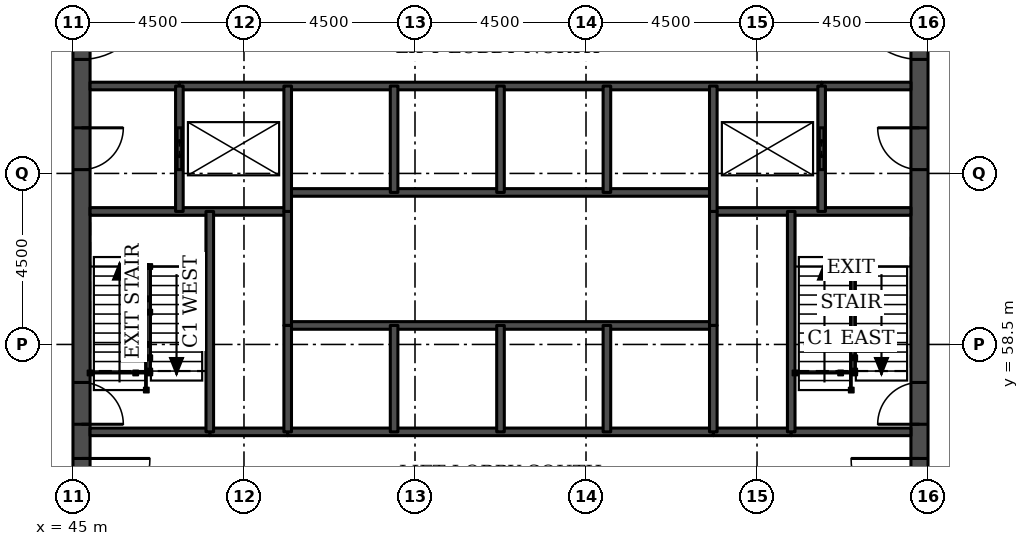
"""IFC4 building model, lengths in metres.
Left out: names, types, materials, properties, quantities, classifications, styles, units other than length and angle.
Written with IfcOpenShell. Run it as: python <this file> out.ifc"""

import sys

from ifc_helpers import new_model, si_unit, direction, frame, frame_2d, origin, place, context, subcontext, project, spatial, rectangle, extrude, element, fill, save


model = new_model("IFC4")
c1 = context("Model", 3, precision=1e-05, world=origin(), true_north=direction((0.0, 1.0)))
c2 = subcontext(c1, "Body", "Model", "MODEL_VIEW")
j1 = project(units=[si_unit("LENGTHUNIT", "METRE"), si_unit("PLANEANGLEUNIT", "RADIAN")], contexts=[c1])
p1 = place(None, origin())
s1 = spatial("IfcSite", under=j1, at=p1, CompositionType="ELEMENT")
p2 = place(p1, origin())
s2 = spatial("IfcBuilding", under=s1, at=p2, CompositionType="ELEMENT")
p3 = place(p2, frame((0.0, 0.0, 78.9)))
s3 = spatial("IfcBuildingStorey", under=s2, at=p3, CompositionType="ELEMENT", Elevation=78.9)
p4 = place(p3, frame((45.225, 49.5, 0.0), z_axis=(0.0, 0.0, 1.0), x_axis=(0.0, 1.0, 0.0)))
e1 = element("IfcWall", 1, at=p4, inside=s3, PredefinedType="SHEAR", context=c2, shape_type="SweptSolid", body=[
    extrude(rectangle(XDim=22.5, YDim=0.45, at=frame_2d((11.25, 0.0))), origin(), (0.0, 0.0, 1.0), 3.7),
])
p5 = place(p4, frame((4.2, 0.0, 0.0)))
e2 = element("IfcOpeningElement", 2, at=p5, cuts=e1, PredefinedType="OPENING", context=c2, shape_type="SweptSolid", body=[
    extrude(rectangle(XDim=1.8, YDim=2.1, at=frame_2d((0.9, 1.05))), frame((0.0, 0.235, 0.0), z_axis=(0.0, -1.0, 0.0), x_axis=(1.0, 0.0, 0.0)), (0.0, 0.0, 1.0), 0.47),
])
p6 = place(p4, frame((6.9, 0.0, 0.0)))
e3 = element("IfcOpeningElement", 3, at=p6, cuts=e1, PredefinedType="OPENING", context=c2, shape_type="SweptSolid", body=[
    extrude(rectangle(XDim=1.1, YDim=2.1, at=frame_2d((0.55, 1.05))), frame((0.0, 0.235, 0.0), z_axis=(0.0, -1.0, 0.0), x_axis=(1.0, 0.0, 0.0)), (0.0, 0.0, 1.0), 0.47),
])
p7 = place(p4, frame((13.6, 0.0, 0.0)))
e4 = element("IfcOpeningElement", 4, at=p7, cuts=e1, PredefinedType="OPENING", context=c2, shape_type="SweptSolid", body=[
    extrude(rectangle(XDim=1.1, YDim=2.1, at=frame_2d((0.55, 1.05))), frame((0.0, 0.235, 0.0), z_axis=(0.0, -1.0, 0.0), x_axis=(1.0, 0.0, 0.0)), (0.0, 0.0, 1.0), 0.47),
])
p8 = place(p4, frame((16.5, 0.0, 0.0)))
e5 = element("IfcOpeningElement", 5, at=p8, cuts=e1, PredefinedType="OPENING", context=c2, shape_type="SweptSolid", body=[
    extrude(rectangle(XDim=1.8, YDim=2.1, at=frame_2d((0.9, 1.05))), frame((0.0, 0.235, 0.0), z_axis=(0.0, -1.0, 0.0), x_axis=(1.0, 0.0, 0.0)), (0.0, 0.0, 1.0), 0.47),
])
p9 = place(p3, frame((67.275, 49.5, 0.0), z_axis=(0.0, 0.0, 1.0), x_axis=(0.0, 1.0, 0.0)))
e6 = element("IfcWall", 6, at=p9, inside=s3, PredefinedType="SHEAR", context=c2, shape_type="SweptSolid", body=[
    extrude(rectangle(XDim=22.5, YDim=0.45, at=frame_2d((11.25, 0.0))), origin(), (0.0, 0.0, 1.0), 3.7),
])
p10 = place(p9, frame((4.2, 0.0, 0.0)))
e7 = element("IfcOpeningElement", 7, at=p10, cuts=e6, PredefinedType="OPENING", context=c2, shape_type="SweptSolid", body=[
    extrude(rectangle(XDim=1.8, YDim=2.1, at=frame_2d((0.9, 1.05))), frame((0.0, 0.235, 0.0), z_axis=(0.0, -1.0, 0.0), x_axis=(1.0, 0.0, 0.0)), (0.0, 0.0, 1.0), 0.47),
])
p11 = place(p9, frame((6.9, 0.0, 0.0)))
e8 = element("IfcOpeningElement", 8, at=p11, cuts=e6, PredefinedType="OPENING", context=c2, shape_type="SweptSolid", body=[
    extrude(rectangle(XDim=1.1, YDim=2.1, at=frame_2d((0.55, 1.05))), frame((0.0, 0.235, 0.0), z_axis=(0.0, -1.0, 0.0), x_axis=(1.0, 0.0, 0.0)), (0.0, 0.0, 1.0), 0.47),
])
p12 = place(p9, frame((13.6, 0.0, 0.0)))
e9 = element("IfcOpeningElement", 9, at=p12, cuts=e6, PredefinedType="OPENING", context=c2, shape_type="SweptSolid", body=[
    extrude(rectangle(XDim=1.1, YDim=2.1, at=frame_2d((0.55, 1.05))), frame((0.0, 0.235, 0.0), z_axis=(0.0, -1.0, 0.0), x_axis=(1.0, 0.0, 0.0)), (0.0, 0.0, 1.0), 0.47),
])
p13 = place(p9, frame((16.5, 0.0, 0.0)))
e10 = element("IfcOpeningElement", 10, at=p13, cuts=e6, PredefinedType="OPENING", context=c2, shape_type="SweptSolid", body=[
    extrude(rectangle(XDim=1.8, YDim=2.1, at=frame_2d((0.9, 1.05))), frame((0.0, 0.235, 0.0), z_axis=(0.0, -1.0, 0.0), x_axis=(1.0, 0.0, 0.0)), (0.0, 0.0, 1.0), 0.47),
])
for number, where, z_axis, x_axis in (
    (11, (48.6, 56.2, 0.0), (0.0, 0.0, 1.0), (1.0, 0.0, 0.0)),
    (12, (61.85, 56.2, 0.0), (0.0, 0.0, 1.0), (1.0, 0.0, 0.0)),
):
    element("IfcWall", number, at=place(p3, frame(where, z_axis=z_axis, x_axis=x_axis)), inside=s3, PredefinedType="SOLIDWALL", context=c2, shape_type="SweptSolid", body=[
        extrude(rectangle(XDim=2.05, YDim=0.2, at=frame_2d((1.025, 0.0))), origin(), (0.0, 0.0, 1.0), 3.55),
    ])
p14 = place(p3, frame((45.45, 56.2, 0.0), z_axis=(0.0, 0.0, 1.0), x_axis=(1.0, 0.0, 0.0)))
e13 = element("IfcWall", 13, at=p14, inside=s3, PredefinedType="SOLIDWALL", context=c2, shape_type="SweptSolid", body=[
    extrude(rectangle(XDim=3.15, YDim=0.2, at=frame_2d((1.575, 0.0))), origin(), (0.0, 0.0, 1.0), 3.55),
])
p15 = place(p3, frame((50.65, 56.2, 0.0), z_axis=(0.0, 0.0, 1.0), x_axis=(1.0, 0.0, 0.0)))
e14 = element("IfcWall", 14, at=p15, inside=s3, PredefinedType="SOLIDWALL", context=c2, shape_type="SweptSolid", body=[
    extrude(rectangle(XDim=11.2, YDim=0.2, at=frame_2d((5.6, 0.0))), origin(), (0.0, 0.0, 1.0), 3.55),
])
p16 = place(p3, frame((63.9, 56.2, 0.0), z_axis=(0.0, 0.0, 1.0), x_axis=(1.0, 0.0, 0.0)))
e15 = element("IfcWall", 15, at=p16, inside=s3, PredefinedType="SOLIDWALL", context=c2, shape_type="SweptSolid", body=[
    extrude(rectangle(XDim=3.15, YDim=0.2, at=frame_2d((1.575, 0.0))), origin(), (0.0, 0.0, 1.0), 3.55),
])
p17 = place(p3, frame((50.65, 59.0, 0.0), z_axis=(0.0, 0.0, 1.0), x_axis=(1.0, 0.0, 0.0)))
e16 = element("IfcWall", 16, at=p17, inside=s3, PredefinedType="SOLIDWALL", context=c2, shape_type="SweptSolid", body=[
    extrude(rectangle(XDim=11.2, YDim=0.2, at=frame_2d((5.6, 0.0))), origin(), (0.0, 0.0, 1.0), 3.7),
])
for number, where, z_axis, x_axis in (
    (17, (45.45, 62.0, 0.0), (0.0, 0.0, 1.0), (1.0, 0.0, 0.0)),
    (18, (61.85, 62.0, 0.0), (0.0, 0.0, 1.0), (1.0, 0.0, 0.0)),
):
    element("IfcWall", number, at=place(p3, frame(where, z_axis=z_axis, x_axis=x_axis)), inside=s3, PredefinedType="SOLIDWALL", context=c2, shape_type="SweptSolid", body=[
        extrude(rectangle(XDim=5.2, YDim=0.2, at=frame_2d((2.6, 0.0))), origin(), (0.0, 0.0, 1.0), 3.55),
    ])
p18 = place(p3, frame((50.65, 62.5, 0.0), z_axis=(0.0, 0.0, 1.0), x_axis=(1.0, 0.0, 0.0)))
e19 = element("IfcWall", 19, at=p18, inside=s3, PredefinedType="SOLIDWALL", context=c2, shape_type="SweptSolid", body=[
    extrude(rectangle(XDim=11.2, YDim=0.2, at=frame_2d((5.6, 0.0))), origin(), (0.0, 0.0, 1.0), 3.7),
])
for number, where, z_axis, x_axis in (
    (20, (45.45, 65.3, 0.0), (0.0, 0.0, 1.0), (1.0, 0.0, 0.0)),
    (21, (64.7, 65.3, 0.0), (0.0, 0.0, 1.0), (1.0, 0.0, 0.0)),
):
    element("IfcWall", number, at=place(p3, frame(where, z_axis=z_axis, x_axis=x_axis)), inside=s3, PredefinedType="SOLIDWALL", context=c2, shape_type="SweptSolid", body=[
        extrude(rectangle(XDim=2.35, YDim=0.2, at=frame_2d((1.175, 0.0))), origin(), (0.0, 0.0, 1.0), 3.55),
    ])
p19 = place(p3, frame((47.8, 65.3, 0.0), z_axis=(0.0, 0.0, 1.0), x_axis=(1.0, 0.0, 0.0)))
e22 = element("IfcWall", 22, at=p19, inside=s3, PredefinedType="SOLIDWALL", context=c2, shape_type="SweptSolid", body=[
    extrude(rectangle(XDim=16.9, YDim=0.2, at=frame_2d((8.45, 0.0))), origin(), (0.0, 0.0, 1.0), 3.55),
])
p20 = place(p3, frame((47.8, 62.0, 0.0), z_axis=(0.0, 0.0, 1.0), x_axis=(0.0, 1.0, 0.0)))
e23 = element("IfcWall", 23, at=p20, inside=s3, PredefinedType="SOLIDWALL", context=c2, shape_type="SweptSolid", body=[
    extrude(rectangle(XDim=3.3, YDim=0.2, at=frame_2d((1.65, 0.0))), origin(), (0.0, 0.0, 1.0), 3.55),
])
p21 = place(p20, frame((1.1, 0.0, 0.0)))
e24 = element("IfcOpeningElement", 24, at=p21, cuts=e23, PredefinedType="OPENING", context=c2, shape_type="SweptSolid", body=[
    extrude(rectangle(XDim=1.1, YDim=2.1, at=frame_2d((0.55, 1.05))), frame((0.0, 0.11, 0.0), z_axis=(0.0, -1.0, 0.0), x_axis=(1.0, 0.0, 0.0)), (0.0, 0.0, 1.0), 0.22),
])
p22 = place(p3, frame((48.6, 56.2, 0.0), z_axis=(0.0, 0.0, 1.0), x_axis=(0.0, 1.0, 0.0)))
e25 = element("IfcWall", 25, at=p22, inside=s3, PredefinedType="SOLIDWALL", context=c2, shape_type="SweptSolid", body=[
    extrude(rectangle(XDim=5.8, YDim=0.2, at=frame_2d((2.9, 0.0))), origin(), (0.0, 0.0, 1.0), 3.55),
])
p23 = place(p3, frame((50.65, 59.0, 0.0), z_axis=(0.0, 0.0, 1.0), x_axis=(0.0, 1.0, 0.0)))
e26 = element("IfcWall", 26, at=p23, inside=s3, PredefinedType="SOLIDWALL", context=c2, shape_type="SweptSolid", body=[
    extrude(rectangle(XDim=3.0, YDim=0.2, at=frame_2d((1.5, 0.0))), origin(), (0.0, 0.0, 1.0), 3.7),
])
p24 = place(p3, frame((50.65, 56.2, 0.0), z_axis=(0.0, 0.0, 1.0), x_axis=(0.0, 1.0, 0.0)))
e27 = element("IfcWall", 27, at=p24, inside=s3, PredefinedType="SOLIDWALL", context=c2, shape_type="SweptSolid", body=[
    extrude(rectangle(XDim=2.8, YDim=0.2, at=frame_2d((1.4, 0.0))), origin(), (0.0, 0.0, 1.0), 3.55),
])
p25 = place(p3, frame((50.65, 62.0, 0.0), z_axis=(0.0, 0.0, 1.0), x_axis=(0.0, 1.0, 0.0)))
e28 = element("IfcWall", 28, at=p25, inside=s3, PredefinedType="SOLIDWALL", context=c2, shape_type="SweptSolid", body=[
    extrude(rectangle(XDim=3.3, YDim=0.2, at=frame_2d((1.65, 0.0))), origin(), (0.0, 0.0, 1.0), 3.55),
])
for number, where, z_axis, x_axis in (
    (29, (53.45, 56.2, 0.0), (0.0, 0.0, 1.0), (0.0, 1.0, 0.0)),
    (30, (53.45, 62.5, 0.0), (0.0, 0.0, 1.0), (0.0, 1.0, 0.0)),
    (31, (56.25, 56.2, 0.0), (0.0, 0.0, 1.0), (0.0, 1.0, 0.0)),
    (32, (56.25, 62.5, 0.0), (0.0, 0.0, 1.0), (0.0, 1.0, 0.0)),
    (33, (59.05, 56.2, 0.0), (0.0, 0.0, 1.0), (0.0, 1.0, 0.0)),
    (34, (59.05, 62.5, 0.0), (0.0, 0.0, 1.0), (0.0, 1.0, 0.0)),
):
    element("IfcWall", number, at=place(p3, frame(where, z_axis=z_axis, x_axis=x_axis)), inside=s3, PredefinedType="SOLIDWALL", context=c2, shape_type="SweptSolid", body=[
        extrude(rectangle(XDim=2.8, YDim=0.2, at=frame_2d((1.4, 0.0))), origin(), (0.0, 0.0, 1.0), 3.55),
    ])
p26 = place(p3, frame((61.85, 59.0, 0.0), z_axis=(0.0, 0.0, 1.0), x_axis=(0.0, 1.0, 0.0)))
e35 = element("IfcWall", 35, at=p26, inside=s3, PredefinedType="SOLIDWALL", context=c2, shape_type="SweptSolid", body=[
    extrude(rectangle(XDim=3.0, YDim=0.2, at=frame_2d((1.5, 0.0))), origin(), (0.0, 0.0, 1.0), 3.7),
])
p27 = place(p3, frame((61.85, 56.2, 0.0), z_axis=(0.0, 0.0, 1.0), x_axis=(0.0, 1.0, 0.0)))
e36 = element("IfcWall", 36, at=p27, inside=s3, PredefinedType="SOLIDWALL", context=c2, shape_type="SweptSolid", body=[
    extrude(rectangle(XDim=2.8, YDim=0.2, at=frame_2d((1.4, 0.0))), origin(), (0.0, 0.0, 1.0), 3.55),
])
p28 = place(p3, frame((61.85, 62.0, 0.0), z_axis=(0.0, 0.0, 1.0), x_axis=(0.0, 1.0, 0.0)))
e37 = element("IfcWall", 37, at=p28, inside=s3, PredefinedType="SOLIDWALL", context=c2, shape_type="SweptSolid", body=[
    extrude(rectangle(XDim=3.3, YDim=0.2, at=frame_2d((1.65, 0.0))), origin(), (0.0, 0.0, 1.0), 3.55),
])
p29 = place(p3, frame((63.9, 56.2, 0.0), z_axis=(0.0, 0.0, 1.0), x_axis=(0.0, 1.0, 0.0)))
e38 = element("IfcWall", 38, at=p29, inside=s3, PredefinedType="SOLIDWALL", context=c2, shape_type="SweptSolid", body=[
    extrude(rectangle(XDim=5.8, YDim=0.2, at=frame_2d((2.9, 0.0))), origin(), (0.0, 0.0, 1.0), 3.55),
])
p30 = place(p3, frame((64.7, 62.0, 0.0), z_axis=(0.0, 0.0, 1.0), x_axis=(0.0, 1.0, 0.0)))
e39 = element("IfcWall", 39, at=p30, inside=s3, PredefinedType="SOLIDWALL", context=c2, shape_type="SweptSolid", body=[
    extrude(rectangle(XDim=3.3, YDim=0.2, at=frame_2d((1.65, 0.0))), origin(), (0.0, 0.0, 1.0), 3.55),
])
p31 = place(p30, frame((1.1, 0.0, 0.0)))
e40 = element("IfcOpeningElement", 40, at=p31, cuts=e39, PredefinedType="OPENING", context=c2, shape_type="SweptSolid", body=[
    extrude(rectangle(XDim=1.1, YDim=2.1, at=frame_2d((0.55, 1.05))), frame((0.0, 0.11, 0.0), z_axis=(0.0, -1.0, 0.0), x_axis=(1.0, 0.0, 0.0)), (0.0, 0.0, 1.0), 0.22),
])
p32 = place(p21, origin())
e41 = element("IfcDoor", 41, at=p32, inside=s3, OperationType="DOUBLE_DOOR_SLIDING", PredefinedType="DOOR", context=c2, shape_type="SweptSolid", body=[
    extrude(rectangle(XDim=1.1, YDim=2.1, at=frame_2d((0.55, 1.05))), frame((0.0, 0.025, 0.0), z_axis=(0.0, -1.0, 0.0), x_axis=(1.0, 0.0, 0.0)), (0.0, 0.0, 1.0), 0.05),
])
fill(e24, e41)
p33 = place(p31, origin())
e42 = element("IfcDoor", 42, at=p33, inside=s3, OperationType="DOUBLE_DOOR_SLIDING", PredefinedType="DOOR", context=c2, shape_type="SweptSolid", body=[
    extrude(rectangle(XDim=1.1, YDim=2.1, at=frame_2d((0.55, 1.05))), frame((0.0, 0.025, 0.0), z_axis=(0.0, -1.0, 0.0), x_axis=(1.0, 0.0, 0.0)), (0.0, 0.0, 1.0), 0.05),
])
fill(e40, e42)
p34 = place(p5, frame((1.8, 0.0, 0.0), z_axis=(0.0, 0.0, 1.0), x_axis=(-1.0, 0.0, 0.0)))
e43 = element("IfcDoor", 43, at=p34, inside=s3, OperationType="SINGLE_SWING_LEFT", PredefinedType="DOOR", context=c2, shape_type="SweptSolid", body=[
    extrude(rectangle(XDim=1.8, YDim=2.1, at=frame_2d((0.9, 1.05))), frame((0.0, 0.025, 0.0), z_axis=(0.0, -1.0, 0.0), x_axis=(1.0, 0.0, 0.0)), (0.0, 0.0, 1.0), 0.05),
])
fill(e2, e43)
p35 = place(p6, frame((1.1, 0.0, 0.0), z_axis=(0.0, 0.0, 1.0), x_axis=(-1.0, 0.0, 0.0)))
e44 = element("IfcDoor", 44, at=p35, inside=s3, OperationType="SINGLE_SWING_RIGHT", PredefinedType="DOOR", context=c2, shape_type="SweptSolid", body=[
    extrude(rectangle(XDim=1.1, YDim=2.1, at=frame_2d((0.55, 1.05))), frame((0.0, 0.025, 0.0), z_axis=(0.0, -1.0, 0.0), x_axis=(1.0, 0.0, 0.0)), (0.0, 0.0, 1.0), 0.05),
])
fill(e3, e44)
p36 = place(p7, frame((1.1, 0.0, 0.0), z_axis=(0.0, 0.0, 1.0), x_axis=(-1.0, 0.0, 0.0)))
e45 = element("IfcDoor", 45, at=p36, inside=s3, OperationType="SINGLE_SWING_LEFT", PredefinedType="DOOR", context=c2, shape_type="SweptSolid", body=[
    extrude(rectangle(XDim=1.1, YDim=2.1, at=frame_2d((0.55, 1.05))), frame((0.0, 0.025, 0.0), z_axis=(0.0, -1.0, 0.0), x_axis=(1.0, 0.0, 0.0)), (0.0, 0.0, 1.0), 0.05),
])
fill(e4, e45)
p37 = place(p8, frame((1.8, 0.0, 0.0), z_axis=(0.0, 0.0, 1.0), x_axis=(-1.0, 0.0, 0.0)))
e46 = element("IfcDoor", 46, at=p37, inside=s3, OperationType="SINGLE_SWING_LEFT", PredefinedType="DOOR", context=c2, shape_type="SweptSolid", body=[
    extrude(rectangle(XDim=1.8, YDim=2.1, at=frame_2d((0.9, 1.05))), frame((0.0, 0.025, 0.0), z_axis=(0.0, -1.0, 0.0), x_axis=(1.0, 0.0, 0.0)), (0.0, 0.0, 1.0), 0.05),
])
fill(e5, e46)
p38 = place(p10, origin())
e47 = element("IfcDoor", 47, at=p38, inside=s3, OperationType="SINGLE_SWING_RIGHT", PredefinedType="DOOR", context=c2, shape_type="SweptSolid", body=[
    extrude(rectangle(XDim=1.8, YDim=2.1, at=frame_2d((0.9, 1.05))), frame((0.0, 0.025, 0.0), z_axis=(0.0, -1.0, 0.0), x_axis=(1.0, 0.0, 0.0)), (0.0, 0.0, 1.0), 0.05),
])
fill(e7, e47)
p39 = place(p11, origin())
e48 = element("IfcDoor", 48, at=p39, inside=s3, OperationType="SINGLE_SWING_LEFT", PredefinedType="DOOR", context=c2, shape_type="SweptSolid", body=[
    extrude(rectangle(XDim=1.1, YDim=2.1, at=frame_2d((0.55, 1.05))), frame((0.0, 0.025, 0.0), z_axis=(0.0, -1.0, 0.0), x_axis=(1.0, 0.0, 0.0)), (0.0, 0.0, 1.0), 0.05),
])
fill(e8, e48)
p40 = place(p12, origin())
e49 = element("IfcDoor", 49, at=p40, inside=s3, OperationType="SINGLE_SWING_RIGHT", PredefinedType="DOOR", context=c2, shape_type="SweptSolid", body=[
    extrude(rectangle(XDim=1.1, YDim=2.1, at=frame_2d((0.55, 1.05))), frame((0.0, 0.025, 0.0), z_axis=(0.0, -1.0, 0.0), x_axis=(1.0, 0.0, 0.0)), (0.0, 0.0, 1.0), 0.05),
])
fill(e9, e49)
p41 = place(p13, origin())
e50 = element("IfcDoor", 50, at=p41, inside=s3, OperationType="SINGLE_SWING_RIGHT", PredefinedType="DOOR", context=c2, shape_type="SweptSolid", body=[
    extrude(rectangle(XDim=1.8, YDim=2.1, at=frame_2d((0.9, 1.05))), frame((0.0, 0.025, 0.0), z_axis=(0.0, -1.0, 0.0), x_axis=(1.0, 0.0, 0.0)), (0.0, 0.0, 1.0), 0.05),
])
fill(e10, e50)
save(model, sys.argv[1])
